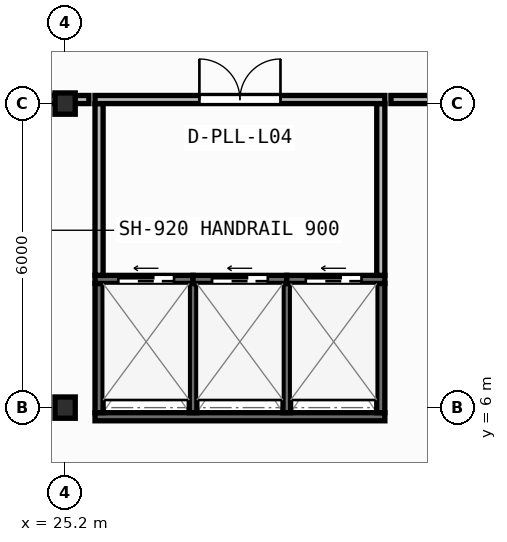
"""IFC4 building model, lengths in metres.
Left out: names, types, materials, properties, quantities, classifications, styles, units other than length and angle.
Written with IfcOpenShell. Run it as: python <this file> out.ifc"""

import sys

from ifc_helpers import new_model, si_unit, direction, frame, frame_2d, origin, origin_2d, place, context, subcontext, project, spatial, rectangle, i_section, extrude, element, fill, save


model = new_model("IFC4")
c1 = context("Model", 3, precision=1e-05, world=origin(), true_north=direction((0.0, 1.0)))
c2 = subcontext(c1, "Body", "Model", "MODEL_VIEW")
j1 = project(units=[si_unit("LENGTHUNIT", "METRE"), si_unit("PLANEANGLEUNIT", "RADIAN")], contexts=[c1])
p1 = place(None, origin())
s1 = spatial("IfcSite", under=j1, at=p1, CompositionType="ELEMENT")
p2 = place(p1, origin())
s2 = spatial("IfcBuilding", under=s1, at=p2, CompositionType="ELEMENT")
p3 = place(p2, frame((0.0, 0.0, 18.0)))
s3 = spatial("IfcBuildingStorey", under=s2, at=p3, CompositionType="ELEMENT", Elevation=18.0)
for number, where, z_axis, x_axis in (
    (1, (25.2, 6.0, 0.0), (0.0, 0.0, 1.0), (1.0, 0.0, 0.0)),
    (2, (25.2, 12.0, 0.0), (0.0, 0.0, 1.0), (1.0, 0.0, 0.0)),
):
    element("IfcColumn", number, at=place(p3, frame(where, z_axis=z_axis, x_axis=x_axis)), inside=s3, PredefinedType="COLUMN", context=c2, shape_type="SweptSolid", body=[
        extrude(i_section(OverallWidth=0.4, OverallDepth=0.42, WebThickness=0.025, FlangeThickness=0.04, at=origin_2d()), origin(), (0.0, 0.0, 1.0), 4.5),
    ])
p4 = place(p3, frame((25.79, 5.82, 0.0), z_axis=(0.0, 0.0, 1.0), x_axis=(1.0, 0.0, 0.0)))
e3 = element("IfcWall", 3, at=p4, inside=s3, PredefinedType="SHEAR", context=c2, shape_type="SweptSolid", body=[
    extrude(rectangle(XDim=5.72, YDim=0.16, at=frame_2d((2.86, 0.0))), origin(), (0.0, 0.0, 1.0), 4.08),
])
for number, where, z_axis, x_axis in (
    (4, (25.87, 5.9, 0.0), (0.0, 0.0, 1.0), (0.0, 1.0, 0.0)),
    (5, (31.43, 5.9, 0.0), (0.0, 0.0, 1.0), (0.0, 1.0, 0.0)),
):
    element("IfcWall", number, at=place(p3, frame(where, z_axis=z_axis, x_axis=x_axis)), inside=s3, PredefinedType="SHEAR", context=c2, shape_type="SweptSolid", body=[
        extrude(rectangle(XDim=2.55, YDim=0.16, at=frame_2d((1.275, 0.0))), origin(), (0.0, 0.0, 1.0), 4.08),
    ])
for number, where, z_axis, x_axis in (
    (6, (27.725, 5.9, 0.0), (0.0, 0.0, 1.0), (0.0, 1.0, 0.0)),
    (7, (29.575, 5.9, 0.0), (0.0, 0.0, 1.0), (0.0, 1.0, 0.0)),
):
    element("IfcWall", number, at=place(p3, frame(where, z_axis=z_axis, x_axis=x_axis)), inside=s3, PredefinedType="SHEAR", context=c2, shape_type="SweptSolid", body=[
        extrude(rectangle(XDim=2.55, YDim=0.15, at=frame_2d((1.275, 0.0))), origin(), (0.0, 0.0, 1.0), 4.08),
    ])
p5 = place(p3, frame((25.79, 8.53, 0.0), z_axis=(0.0, 0.0, 1.0), x_axis=(1.0, 0.0, 0.0)))
e8 = element("IfcWall", 8, at=p5, inside=s3, PredefinedType="SHEAR", context=c2, shape_type="SweptSolid", body=[
    extrude(rectangle(XDim=1.935, YDim=0.16, at=frame_2d((0.968, 0.0))), origin(), (0.0, 0.0, 1.0), 4.08),
])
p6 = place(p5, frame((0.46, 0.0, 0.0)))
e9 = element("IfcOpeningElement", 9, at=p6, cuts=e8, PredefinedType="OPENING", context=c2, shape_type="SweptSolid", body=[
    extrude(rectangle(XDim=1.1, YDim=2.15, at=frame_2d((0.55, 1.075))), frame((0.0, 0.09, 0.0), z_axis=(0.0, -1.0, 0.0), x_axis=(1.0, 0.0, 0.0)), (0.0, 0.0, 1.0), 0.18),
])
p7 = place(p3, frame((27.725, 8.53, 0.0), z_axis=(0.0, 0.0, 1.0), x_axis=(1.0, 0.0, 0.0)))
e10 = element("IfcWall", 10, at=p7, inside=s3, PredefinedType="SHEAR", context=c2, shape_type="SweptSolid", body=[
    extrude(rectangle(XDim=1.85, YDim=0.16, at=frame_2d((0.925, 0.0))), origin(), (0.0, 0.0, 1.0), 4.08),
])
p8 = place(p7, frame((0.375, 0.0, 0.0)))
e11 = element("IfcOpeningElement", 11, at=p8, cuts=e10, PredefinedType="OPENING", context=c2, shape_type="SweptSolid", body=[
    extrude(rectangle(XDim=1.1, YDim=2.15, at=frame_2d((0.55, 1.075))), frame((0.0, 0.09, 0.0), z_axis=(0.0, -1.0, 0.0), x_axis=(1.0, 0.0, 0.0)), (0.0, 0.0, 1.0), 0.18),
])
p9 = place(p3, frame((29.575, 8.53, 0.0), z_axis=(0.0, 0.0, 1.0), x_axis=(1.0, 0.0, 0.0)))
e12 = element("IfcWall", 12, at=p9, inside=s3, PredefinedType="SHEAR", context=c2, shape_type="SweptSolid", body=[
    extrude(rectangle(XDim=1.935, YDim=0.16, at=frame_2d((0.968, 0.0))), origin(), (0.0, 0.0, 1.0), 4.08),
])
p10 = place(p9, frame((0.375, 0.0, 0.0)))
e13 = element("IfcOpeningElement", 13, at=p10, cuts=e12, PredefinedType="OPENING", context=c2, shape_type="SweptSolid", body=[
    extrude(rectangle(XDim=1.1, YDim=2.15, at=frame_2d((0.55, 1.075))), frame((0.0, 0.09, 0.0), z_axis=(0.0, -1.0, 0.0), x_axis=(1.0, 0.0, 0.0)), (0.0, 0.0, 1.0), 0.18),
])
for number, where, z_axis, x_axis in (
    (14, (25.87, 8.61, 0.0), (0.0, 0.0, 1.0), (0.0, 1.0, 0.0)),
    (15, (31.43, 8.61, 0.0), (0.0, 0.0, 1.0), (0.0, 1.0, 0.0)),
):
    element("IfcWall", number, at=place(p3, frame(where, z_axis=z_axis, x_axis=x_axis)), inside=s3, PredefinedType="PARTITIONING", context=c2, shape_type="SweptSolid", body=[
        extrude(rectangle(XDim=3.39, YDim=0.16, at=frame_2d((1.695, 0.0))), origin(), (0.0, 0.0, 1.0), 4.08),
    ])
p11 = place(p3, frame((25.79, 12.08, 0.0), z_axis=(0.0, 0.0, 1.0), x_axis=(1.0, 0.0, 0.0)))
e16 = element("IfcWall", 16, at=p11, inside=s3, PredefinedType="PARTITIONING", context=c2, shape_type="SweptSolid", body=[
    extrude(rectangle(XDim=5.72, YDim=0.16, at=frame_2d((2.86, 0.0))), origin(), (0.0, 0.0, 1.0), 3.255),
])
p12 = place(p11, frame((2.06, 0.0, 0.0)))
e17 = element("IfcOpeningElement", 17, at=p12, cuts=e16, PredefinedType="OPENING", context=c2, shape_type="SweptSolid", body=[
    extrude(rectangle(XDim=1.6, YDim=2.05, at=frame_2d((0.8, 1.025))), frame((0.0, 0.09, 0.0), z_axis=(0.0, -1.0, 0.0), x_axis=(1.0, 0.0, 0.0)), (0.0, 0.0, 1.0), 0.18),
])
p13 = place(p3, frame((24.02, 12.08, 0.0), z_axis=(0.0, 0.0, 1.0), x_axis=(1.0, 0.0, 0.0)))
e18 = element("IfcWall", 18, at=p13, inside=s3, PredefinedType="PARTITIONING", context=c2, shape_type="SweptSolid", body=[
    extrude(rectangle(XDim=1.65, YDim=0.16, at=frame_2d((0.825, 0.0))), origin(), (0.0, 0.0, 1.0), 3.255),
])
p14 = place(p3, frame((31.63, 12.08, 0.0), z_axis=(0.0, 0.0, 1.0), x_axis=(1.0, 0.0, 0.0)))
e19 = element("IfcWall", 19, at=p14, inside=s3, PredefinedType="PARTITIONING", context=c2, shape_type="SweptSolid", body=[
    extrude(rectangle(XDim=11.181, YDim=0.16, at=frame_2d((5.59, 0.0))), origin(), (0.0, 0.0, 1.0), 3.255),
])
p15 = place(p6, origin())
e20 = element("IfcDoor", 20, at=p15, inside=s3, OperationType="SLIDING_TO_LEFT", PredefinedType="DOOR", context=c2, shape_type="SweptSolid", body=[
    extrude(rectangle(XDim=1.1, YDim=2.15, at=frame_2d((0.55, 1.075))), frame((0.0, 0.025, 0.0), z_axis=(0.0, -1.0, 0.0), x_axis=(1.0, 0.0, 0.0)), (0.0, 0.0, 1.0), 0.05),
])
fill(e9, e20)
p16 = place(p8, origin())
e21 = element("IfcDoor", 21, at=p16, inside=s3, OperationType="SLIDING_TO_LEFT", PredefinedType="DOOR", context=c2, shape_type="SweptSolid", body=[
    extrude(rectangle(XDim=1.1, YDim=2.15, at=frame_2d((0.55, 1.075))), frame((0.0, 0.025, 0.0), z_axis=(0.0, -1.0, 0.0), x_axis=(1.0, 0.0, 0.0)), (0.0, 0.0, 1.0), 0.05),
])
fill(e11, e21)
p17 = place(p10, origin())
e22 = element("IfcDoor", 22, at=p17, inside=s3, OperationType="SLIDING_TO_LEFT", PredefinedType="DOOR", context=c2, shape_type="SweptSolid", body=[
    extrude(rectangle(XDim=1.1, YDim=2.15, at=frame_2d((0.55, 1.075))), frame((0.0, 0.025, 0.0), z_axis=(0.0, -1.0, 0.0), x_axis=(1.0, 0.0, 0.0)), (0.0, 0.0, 1.0), 0.05),
])
fill(e13, e22)
p18 = place(p12, origin())
e23 = element("IfcDoor", 23, at=p18, inside=s3, OperationType="DOUBLE_DOOR_SINGLE_SWING", PredefinedType="DOOR", context=c2, shape_type="SweptSolid", body=[
    extrude(rectangle(XDim=1.6, YDim=2.05, at=frame_2d((0.8, 1.025))), frame((0.0, 0.025, 0.0), z_axis=(0.0, -1.0, 0.0), x_axis=(1.0, 0.0, 0.0)), (0.0, 0.0, 1.0), 0.05),
])
fill(e17, e23)
save(model, sys.argv[1])
